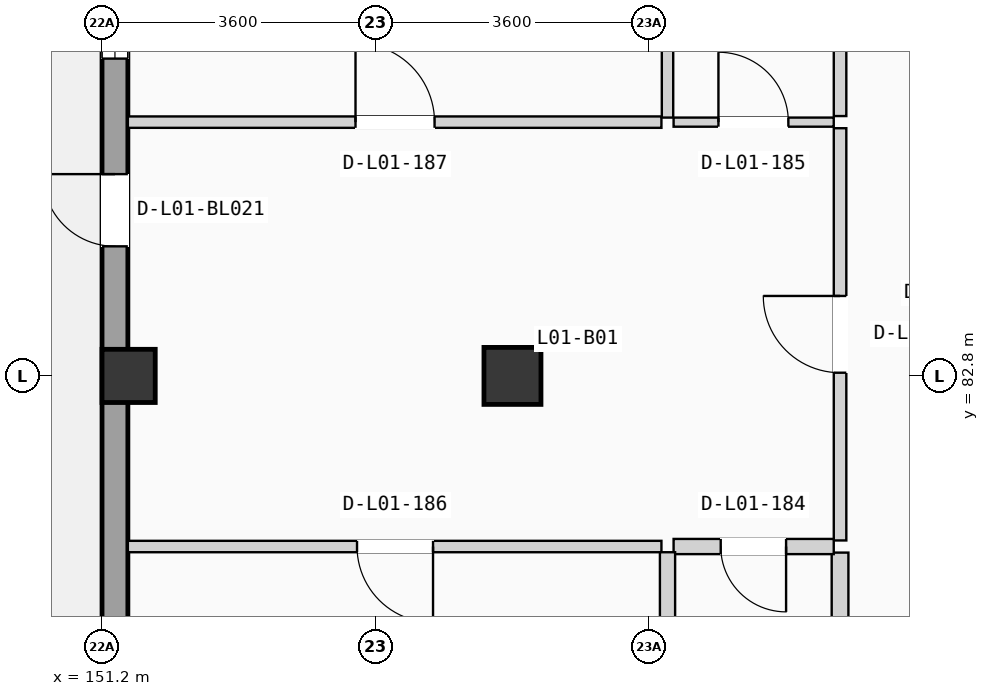
"""IFC4 building model, lengths in metres.
Left out: names, types, materials, properties, quantities, classifications, styles, units other than length and angle.
Written with IfcOpenShell. Run it as: python <this file> out.ifc"""

import sys

from ifc_helpers import new_model, si_unit, direction, frame, frame_2d, origin, origin_2d, place, context, subcontext, project, spatial, rectangle, extrude, element, fill, save


model = new_model("IFC4")
c1 = context("Model", 3, precision=1e-05, world=origin(), true_north=direction((0.0, 1.0)))
c2 = subcontext(c1, "Body", "Model", "MODEL_VIEW")
j1 = project(units=[si_unit("LENGTHUNIT", "METRE"), si_unit("PLANEANGLEUNIT", "RADIAN")], contexts=[c1])
p1 = place(None, origin())
s1 = spatial("IfcSite", under=j1, at=p1, CompositionType="ELEMENT")
p2 = place(p1, origin())
s2 = spatial("IfcBuilding", under=s1, at=p2, CompositionType="ELEMENT")
p3 = place(p2, frame((0.0, 0.0, 4.9)))
s3 = spatial("IfcBuildingStorey", under=s2, at=p3, CompositionType="ELEMENT", Elevation=4.9)
p4 = place(p3, frame((151.55, 82.8, 0.0), z_axis=(0.0, 0.0, 1.0), x_axis=(1.0, 0.0, 0.0)))
e1 = element("IfcColumn", 1, at=p4, inside=s3, PredefinedType="COLUMN", context=c2, shape_type="SweptSolid", body=[
    extrude(rectangle(XDim=0.7, YDim=0.7, at=origin_2d()), origin(), (0.0, 0.0, 1.0), 3.675),
])
p5 = place(p3, frame((156.6, 82.8, 0.0), z_axis=(0.0, 0.0, 1.0), x_axis=(1.0, 0.0, 0.0)))
e2 = element("IfcColumn", 2, at=p5, inside=s3, PredefinedType="COLUMN", context=c2, shape_type="SweptSolid", body=[
    extrude(rectangle(XDim=0.75, YDim=0.75, at=origin_2d()), origin(), (0.0, 0.0, 1.0), 3.675),
])
p6 = place(p3, frame((151.37, 68.74, 0.0), z_axis=(0.0, 0.0, 1.0), x_axis=(0.0, 1.0, 0.0)))
e3 = element("IfcWall", 3, at=p6, inside=s3, PredefinedType="SOLIDWALL", context=c2, shape_type="SweptSolid", body=[
    extrude(rectangle(XDim=49.72, YDim=0.34, at=frame_2d((24.86, 0.0))), origin(), (0.0, 0.0, 1.0), 3.415),
])
p7 = place(p6, frame((15.765, 0.0, 0.0)))
e4 = element("IfcOpeningElement", 4, at=p7, cuts=e3, PredefinedType="OPENING", context=c2, shape_type="SweptSolid", body=[
    extrude(rectangle(XDim=0.95, YDim=2.15, at=frame_2d((0.475, 1.075))), frame((0.0, 0.18, 0.0), z_axis=(0.0, -1.0, 0.0), x_axis=(1.0, 0.0, 0.0)), (0.0, 0.0, 1.0), 0.36),
])
p8 = place(p6, frame((8.498, 0.0, 0.9)))
e5 = element("IfcOpeningElement", 5, at=p8, cuts=e3, PredefinedType="OPENING", context=c2, shape_type="SweptSolid", body=[
    extrude(rectangle(XDim=2.0, YDim=1.65, at=frame_2d((1.0, 0.825))), frame((0.0, 0.18, 0.0), z_axis=(0.0, -1.0, 0.0), x_axis=(1.0, 0.0, 0.0)), (0.0, 0.0, 1.0), 0.36),
])
p9 = place(p6, frame((18.235, 0.0, 0.9)))
e6 = element("IfcOpeningElement", 6, at=p9, cuts=e3, PredefinedType="OPENING", context=c2, shape_type="SweptSolid", body=[
    extrude(rectangle(XDim=2.0, YDim=1.8, at=frame_2d((1.0, 0.9))), frame((0.0, 0.18, 0.0), z_axis=(0.0, -1.0, 0.0), x_axis=(1.0, 0.0, 0.0)), (0.0, 0.0, 1.0), 0.36),
])
p10 = place(p6, frame((32.345, 0.0, 0.0)))
e7 = element("IfcOpeningElement", 7, at=p10, cuts=e3, PredefinedType="OPENING", context=c2, shape_type="SweptSolid", body=[
    extrude(rectangle(XDim=1.08, YDim=2.18, at=frame_2d((0.54, 1.09))), frame((0.0, 0.18, 0.0), z_axis=(0.0, -1.0, 0.0), x_axis=(1.0, 0.0, 0.0)), (0.0, 0.0, 1.0), 0.36),
])
p11 = place(p6, frame((24.087, 0.0, 0.9)))
e8 = element("IfcOpeningElement", 8, at=p11, cuts=e3, PredefinedType="OPENING", context=c2, shape_type="SweptSolid", body=[
    extrude(rectangle(XDim=2.15, YDim=1.2, at=frame_2d((1.075, 0.6))), frame((0.0, 0.18, 0.0), z_axis=(0.0, -1.0, 0.0), x_axis=(1.0, 0.0, 0.0)), (0.0, 0.0, 1.0), 0.36),
])
p12 = place(p6, frame((38.12, 0.0, 0.9)))
e9 = element("IfcOpeningElement", 9, at=p12, cuts=e3, PredefinedType="OPENING", context=c2, shape_type="SweptSolid", body=[
    extrude(rectangle(XDim=2.15, YDim=1.35, at=frame_2d((1.075, 0.675))), frame((0.0, 0.18, 0.0), z_axis=(0.0, -1.0, 0.0), x_axis=(1.0, 0.0, 0.0)), (0.0, 0.0, 1.0), 0.36),
])
p13 = place(p3, frame((160.91, 80.635, 0.0), z_axis=(0.0, 0.0, 1.0), x_axis=(0.0, 1.0, 0.0)))
e10 = element("IfcWall", 10, at=p13, inside=s3, PredefinedType="PARTITIONING", context=c2, shape_type="SweptSolid", body=[
    extrude(rectangle(XDim=5.424, YDim=0.165, at=frame_2d((2.712, 0.0))), origin(), (0.0, 0.0, 1.0), 3.395),
])
p14 = place(p13, frame((2.207, 0.0, 0.0)))
e11 = element("IfcOpeningElement", 11, at=p14, cuts=e10, PredefinedType="OPENING", context=c2, shape_type="SweptSolid", body=[
    extrude(rectangle(XDim=1.01, YDim=2.11, at=frame_2d((0.505, 1.055))), frame((0.0, 0.093, 0.0), z_axis=(0.0, -1.0, 0.0), x_axis=(1.0, 0.0, 0.0)), (0.0, 0.0, 1.0), 0.185),
])
p15 = place(p3, frame((160.91, 76.0, 0.0), z_axis=(0.0, 0.0, 1.0), x_axis=(0.0, 1.0, 0.0)))
e12 = element("IfcWall", 12, at=p15, inside=s3, PredefinedType="PLUMBINGWALL", context=c2, shape_type="SweptSolid", body=[
    extrude(rectangle(XDim=4.475, YDim=0.22, at=frame_2d((2.238, 0.0))), origin(), (0.0, 0.0, 1.0), 3.395),
])
p16 = place(p3, frame((160.91, 86.219, 0.0), z_axis=(0.0, 0.0, 1.0), x_axis=(0.0, 1.0, 0.0)))
e13 = element("IfcWall", 13, at=p16, inside=s3, PredefinedType="PARTITIONING", context=c2, shape_type="SweptSolid", body=[
    extrude(rectangle(XDim=4.475, YDim=0.165, at=frame_2d((2.238, 0.0))), origin(), (0.0, 0.0, 1.0), 3.395),
])
p17 = place(p3, frame((158.72, 80.555, 0.0), z_axis=(0.0, 0.0, 1.0), x_axis=(1.0, 0.0, 0.0)))
e14 = element("IfcWall", 14, at=p17, inside=s3, PredefinedType="PLUMBINGWALL", context=c2, shape_type="SweptSolid", body=[
    extrude(rectangle(XDim=2.107, YDim=0.2, at=frame_2d((1.053, 0.0))), origin(), (0.0, 0.0, 1.0), 3.395),
])
p18 = place(p17, frame((0.62, 0.0, 0.0)))
e15 = element("IfcOpeningElement", 15, at=p18, cuts=e14, PredefinedType="OPENING", context=c2, shape_type="SweptSolid", body=[
    extrude(rectangle(XDim=0.86, YDim=2.0, at=frame_2d((0.43, 1.0))), frame((0.0, 0.11, 0.0), z_axis=(0.0, -1.0, 0.0), x_axis=(1.0, 0.0, 0.0)), (0.0, 0.0, 1.0), 0.22),
])
p19 = place(p3, frame((158.72, 86.139, 0.0), z_axis=(0.0, 0.0, 1.0), x_axis=(1.0, 0.0, 0.0)))
e16 = element("IfcWall", 16, at=p19, inside=s3, PredefinedType="PARTITIONING", context=c2, shape_type="SweptSolid", body=[
    extrude(rectangle(XDim=2.107, YDim=0.12, at=frame_2d((1.053, 0.0))), origin(), (0.0, 0.0, 1.0), 3.395),
])
p20 = place(p19, frame((0.59, 0.0, 0.0)))
e17 = element("IfcOpeningElement", 17, at=p20, cuts=e16, PredefinedType="OPENING", context=c2, shape_type="SweptSolid", body=[
    extrude(rectangle(XDim=0.92, YDim=2.02, at=frame_2d((0.46, 1.01))), frame((0.0, 0.07, 0.0), z_axis=(0.0, -1.0, 0.0), x_axis=(1.0, 0.0, 0.0)), (0.0, 0.0, 1.0), 0.14),
])
p21 = place(p3, frame((151.54, 80.555, 0.0), z_axis=(0.0, 0.0, 1.0), x_axis=(1.0, 0.0, 0.0)))
e18 = element("IfcWall", 18, at=p21, inside=s3, PredefinedType="PARTITIONING", context=c2, shape_type="SweptSolid", body=[
    extrude(rectangle(XDim=7.02, YDim=0.15, at=frame_2d((3.51, 0.0))), origin(), (0.0, 0.0, 1.0), 3.395),
])
p22 = place(p21, frame((3.015, 0.0, 0.0)))
e19 = element("IfcOpeningElement", 19, at=p22, cuts=e18, PredefinedType="OPENING", context=c2, shape_type="SweptSolid", body=[
    extrude(rectangle(XDim=1.0, YDim=2.06, at=frame_2d((0.5, 1.03))), frame((0.0, 0.085, 0.0), z_axis=(0.0, -1.0, 0.0), x_axis=(1.0, 0.0, 0.0)), (0.0, 0.0, 1.0), 0.17),
])
p23 = place(p3, frame((151.54, 86.139, 0.0), z_axis=(0.0, 0.0, 1.0), x_axis=(1.0, 0.0, 0.0)))
e20 = element("IfcWall", 20, at=p23, inside=s3, PredefinedType="PARTITIONING", context=c2, shape_type="SweptSolid", body=[
    extrude(rectangle(XDim=7.02, YDim=0.15, at=frame_2d((3.51, 0.0))), origin(), (0.0, 0.0, 1.0), 3.395),
])
p24 = place(p23, frame((2.995, 0.0, 0.0)))
e21 = element("IfcOpeningElement", 21, at=p24, cuts=e20, PredefinedType="OPENING", context=c2, shape_type="SweptSolid", body=[
    extrude(rectangle(XDim=1.04, YDim=2.08, at=frame_2d((0.52, 1.04))), frame((0.0, 0.085, 0.0), z_axis=(0.0, -1.0, 0.0), x_axis=(1.0, 0.0, 0.0)), (0.0, 0.0, 1.0), 0.17),
])
p25 = place(p3, frame((158.64, 76.0, 0.0), z_axis=(0.0, 0.0, 1.0), x_axis=(0.0, 1.0, 0.0)))
e22 = element("IfcWall", 22, at=p25, inside=s3, PredefinedType="PLUMBINGWALL", context=c2, shape_type="SweptSolid", body=[
    extrude(rectangle(XDim=4.48, YDim=0.2, at=frame_2d((2.24, 0.0))), origin(), (0.0, 0.0, 1.0), 3.395),
])
p26 = place(p3, frame((158.64, 86.199, 0.0), z_axis=(0.0, 0.0, 1.0), x_axis=(0.0, 1.0, 0.0)))
e23 = element("IfcWall", 23, at=p26, inside=s3, PredefinedType="PARTITIONING", context=c2, shape_type="SweptSolid", body=[
    extrude(rectangle(XDim=4.495, YDim=0.15, at=frame_2d((2.248, 0.0))), origin(), (0.0, 0.0, 1.0), 3.395),
])
p27 = place(p7, origin())
e24 = element("IfcDoor", 24, at=p27, inside=s3, OperationType="SINGLE_SWING_RIGHT", PredefinedType="DOOR", context=c2, shape_type="SweptSolid", body=[
    extrude(rectangle(XDim=0.95, YDim=2.15, at=frame_2d((0.475, 1.075))), frame((0.0, 0.025, 0.0), z_axis=(0.0, -1.0, 0.0), x_axis=(1.0, 0.0, 0.0)), (0.0, 0.0, 1.0), 0.05),
])
fill(e4, e24)
p28 = place(p9, origin())
e25 = element("IfcWindow", 25, at=p28, inside=s3, PartitioningType="DOUBLE_PANEL_VERTICAL", PredefinedType="WINDOW", context=c2, shape_type="SweptSolid", body=[
    extrude(rectangle(XDim=2.0, YDim=1.8, at=frame_2d((1.0, 0.9))), frame((0.0, 0.03, 0.0), z_axis=(0.0, -1.0, 0.0), x_axis=(1.0, 0.0, 0.0)), (0.0, 0.0, 1.0), 0.06),
])
fill(e6, e25)
p29 = place(p14, origin())
e26 = element("IfcDoor", 26, at=p29, inside=s3, OperationType="SINGLE_SWING_RIGHT", PredefinedType="DOOR", context=c2, shape_type="SweptSolid", body=[
    extrude(rectangle(XDim=1.01, YDim=2.11, at=frame_2d((0.505, 1.055))), frame((0.0, 0.025, 0.0), z_axis=(0.0, -1.0, 0.0), x_axis=(1.0, 0.0, 0.0)), (0.0, 0.0, 1.0), 0.05),
])
fill(e11, e26)
p30 = place(p18, frame((0.86, 0.0, 0.0), z_axis=(0.0, 0.0, 1.0), x_axis=(-1.0, 0.0, 0.0)))
e27 = element("IfcDoor", 27, at=p30, inside=s3, OperationType="SINGLE_SWING_RIGHT", PredefinedType="DOOR", context=c2, shape_type="SweptSolid", body=[
    extrude(rectangle(XDim=0.86, YDim=2.0, at=frame_2d((0.43, 1.0))), frame((0.0, 0.025, 0.0), z_axis=(0.0, -1.0, 0.0), x_axis=(1.0, 0.0, 0.0)), (0.0, 0.0, 1.0), 0.05),
])
fill(e15, e27)
p31 = place(p20, origin())
e28 = element("IfcDoor", 28, at=p31, inside=s3, OperationType="SINGLE_SWING_LEFT", PredefinedType="DOOR", context=c2, shape_type="SweptSolid", body=[
    extrude(rectangle(XDim=0.92, YDim=2.02, at=frame_2d((0.46, 1.01))), frame((0.0, 0.025, 0.0), z_axis=(0.0, -1.0, 0.0), x_axis=(1.0, 0.0, 0.0)), (0.0, 0.0, 1.0), 0.05),
])
fill(e17, e28)
p32 = place(p22, frame((1.0, 0.0, 0.0), z_axis=(0.0, 0.0, 1.0), x_axis=(-1.0, 0.0, 0.0)))
e29 = element("IfcDoor", 29, at=p32, inside=s3, OperationType="SINGLE_SWING_RIGHT", PredefinedType="DOOR", context=c2, shape_type="SweptSolid", body=[
    extrude(rectangle(XDim=1.0, YDim=2.06, at=frame_2d((0.5, 1.03))), frame((0.0, 0.025, 0.0), z_axis=(0.0, -1.0, 0.0), x_axis=(1.0, 0.0, 0.0)), (0.0, 0.0, 1.0), 0.05),
])
fill(e19, e29)
p33 = place(p24, origin())
e30 = element("IfcDoor", 30, at=p33, inside=s3, OperationType="SINGLE_SWING_LEFT", PredefinedType="DOOR", context=c2, shape_type="SweptSolid", body=[
    extrude(rectangle(XDim=1.04, YDim=2.08, at=frame_2d((0.52, 1.04))), frame((0.0, 0.025, 0.0), z_axis=(0.0, -1.0, 0.0), x_axis=(1.0, 0.0, 0.0)), (0.0, 0.0, 1.0), 0.05),
])
fill(e21, e30)
save(model, sys.argv[1])
